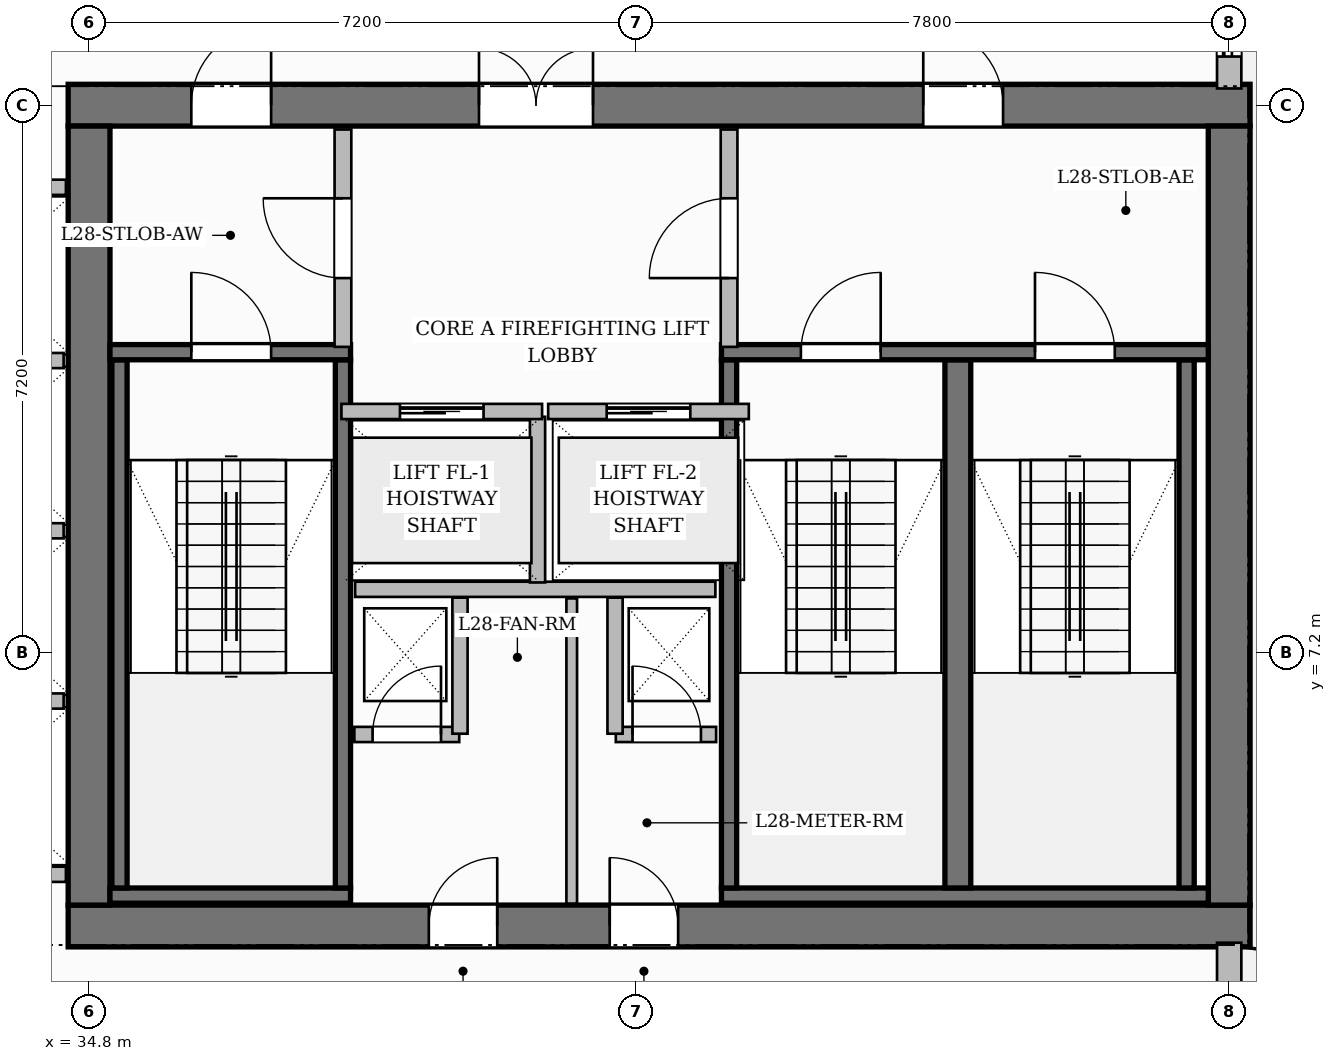
"""IFC4 building model, lengths in metres.
Left out: names, types, materials, properties, quantities, classifications, styles, units other than length and angle.
Written with IfcOpenShell. Run it as: python <this file> out.ifc"""

import sys

from ifc_helpers import new_model, si_unit, direction, frame, frame_2d, origin, place, context, subcontext, project, spatial, rectangle, extrude, source, transform, mapped, element, fill, save


model = new_model("IFC4")
c1 = context("Model", 3, precision=1e-05, world=origin(), true_north=direction((0.0, 1.0)))
c2 = subcontext(c1, "Body", "Model", "MODEL_VIEW")
j1 = project(units=[si_unit("LENGTHUNIT", "METRE"), si_unit("PLANEANGLEUNIT", "RADIAN")], contexts=[c1])
p1 = place(None, origin())
s1 = spatial("IfcSite", under=j1, at=p1, CompositionType="ELEMENT")
p2 = place(p1, origin())
s2 = spatial("IfcBuilding", under=s1, at=p2, CompositionType="ELEMENT")
p3 = place(p2, frame((0.0, 0.0, 115.5)))
s3 = spatial("IfcBuildingStorey", under=s2, at=p3, CompositionType="ELEMENT", Elevation=115.5)
p4 = place(p3, frame((34.525, 3.6, 0.0), z_axis=(0.0, 0.0, 1.0), x_axis=(1.0, 0.0, 0.0)))
e1 = element("IfcWall", 1, at=p4, inside=s3, PredefinedType="SHEAR", context=c2, shape_type="SweptSolid", body=[
    extrude(rectangle(XDim=15.55, YDim=0.55, at=frame_2d((7.775, 0.0))), origin(), (0.0, 0.0, 1.0), 3.7),
])
p5 = place(p4, frame((4.745, 0.0, 0.0)))
e2 = element("IfcOpeningElement", 2, at=p5, cuts=e1, PredefinedType="OPENING", context=c2, shape_type="SweptSolid", body=[
    extrude(rectangle(XDim=0.9, YDim=2.1, at=frame_2d((0.45, 1.05))), frame((0.0, 0.285, 0.0), z_axis=(0.0, -1.0, 0.0), x_axis=(1.0, 0.0, 0.0)), (0.0, 0.0, 1.0), 0.57),
])
p6 = place(p4, frame((7.125, 0.0, 0.0)))
e3 = element("IfcOpeningElement", 3, at=p6, cuts=e1, PredefinedType="OPENING", context=c2, shape_type="SweptSolid", body=[
    extrude(rectangle(XDim=0.9, YDim=2.1, at=frame_2d((0.45, 1.05))), frame((0.0, 0.285, 0.0), z_axis=(0.0, -1.0, 0.0), x_axis=(1.0, 0.0, 0.0)), (0.0, 0.0, 1.0), 0.57),
])
p7 = place(p3, frame((34.525, 14.4, 0.0), z_axis=(0.0, 0.0, 1.0), x_axis=(1.0, 0.0, 0.0)))
e4 = element("IfcWall", 4, at=p7, inside=s3, PredefinedType="SHEAR", context=c2, shape_type="SweptSolid", body=[
    extrude(rectangle(XDim=15.55, YDim=0.55, at=frame_2d((7.775, 0.0))), origin(), (0.0, 0.0, 1.0), 3.7),
])
p8 = place(p7, frame((5.405, 0.0, 0.0)))
e5 = element("IfcOpeningElement", 5, at=p8, cuts=e4, PredefinedType="OPENING", context=c2, shape_type="SweptSolid", body=[
    extrude(rectangle(XDim=1.5, YDim=2.2, at=frame_2d((0.75, 1.1))), frame((0.0, 0.285, 0.0), z_axis=(0.0, -1.0, 0.0), x_axis=(1.0, 0.0, 0.0)), (0.0, 0.0, 1.0), 0.57),
])
p9 = place(p7, frame((1.62, 0.0, 0.0)))
e6 = element("IfcOpeningElement", 6, at=p9, cuts=e4, PredefinedType="OPENING", context=c2, shape_type="SweptSolid", body=[
    extrude(rectangle(XDim=1.05, YDim=2.15, at=frame_2d((0.525, 1.075))), frame((0.0, 0.285, 0.0), z_axis=(0.0, -1.0, 0.0), x_axis=(1.0, 0.0, 0.0)), (0.0, 0.0, 1.0), 0.57),
])
p10 = place(p7, frame((11.25, 0.0, 0.0)))
e7 = element("IfcOpeningElement", 7, at=p10, cuts=e4, PredefinedType="OPENING", context=c2, shape_type="SweptSolid", body=[
    extrude(rectangle(XDim=1.05, YDim=2.15, at=frame_2d((0.525, 1.075))), frame((0.0, 0.285, 0.0), z_axis=(0.0, -1.0, 0.0), x_axis=(1.0, 0.0, 0.0)), (0.0, 0.0, 1.0), 0.57),
])
for number, where, z_axis, x_axis in (
    (8, (34.8, 3.875, 0.0), (0.0, 0.0, 1.0), (0.0, 1.0, 0.0)),
    (9, (49.8, 3.875, 0.0), (0.0, 0.0, 1.0), (0.0, 1.0, 0.0)),
):
    element("IfcWall", number, at=place(p3, frame(where, z_axis=z_axis, x_axis=x_axis)), inside=s3, PredefinedType="SHEAR", context=c2, shape_type="SweptSolid", body=[
        extrude(rectangle(XDim=10.25, YDim=0.55, at=frame_2d((5.125, 0.0))), origin(), (0.0, 0.0, 1.0), 3.7),
    ])
p11 = place(p3, frame((35.075, 4.0, 0.0), z_axis=(0.0, 0.0, 1.0), x_axis=(1.0, 0.0, 0.0)))
e10 = element("IfcWall", 10, at=p11, inside=s3, PredefinedType="SHEAR", context=c2, shape_type="SweptSolid", body=[
    extrude(rectangle(XDim=3.165, YDim=0.2, at=frame_2d((1.583, 0.0))), origin(), (0.0, 0.0, 1.0), 3.7),
])
for number, where, z_axis, x_axis in (
    (11, (35.2, 4.1, 0.0), (0.0, 0.0, 1.0), (0.0, 1.0, 0.0)),
    (12, (38.14, 4.1, 0.0), (0.0, 0.0, 1.0), (0.0, 1.0, 0.0)),
):
    element("IfcWall", number, at=place(p3, frame(where, z_axis=z_axis, x_axis=x_axis)), inside=s3, PredefinedType="SHEAR", context=c2, shape_type="SweptSolid", body=[
        extrude(rectangle(XDim=6.95, YDim=0.2, at=frame_2d((3.475, 0.0))), origin(), (0.0, 0.0, 1.0), 3.7),
    ])
p12 = place(p3, frame((35.075, 11.15, 0.0), z_axis=(0.0, 0.0, 1.0), x_axis=(1.0, 0.0, 0.0)))
e13 = element("IfcWall", 13, at=p12, inside=s3, PredefinedType="SHEAR", context=c2, shape_type="SweptSolid", body=[
    extrude(rectangle(XDim=3.165, YDim=0.2, at=frame_2d((1.583, 0.0))), origin(), (0.0, 0.0, 1.0), 3.7),
])
p13 = place(p12, frame((1.07, 0.0, 0.0)))
e14 = element("IfcOpeningElement", 14, at=p13, cuts=e13, PredefinedType="OPENING", context=c2, shape_type="SweptSolid", body=[
    extrude(rectangle(XDim=1.05, YDim=2.2, at=frame_2d((0.525, 1.1))), frame((0.0, 0.11, 0.0), z_axis=(0.0, -1.0, 0.0), x_axis=(1.0, 0.0, 0.0)), (0.0, 0.0, 1.0), 0.22),
])
p14 = place(p3, frame((43.12, 4.0, 0.0), z_axis=(0.0, 0.0, 1.0), x_axis=(1.0, 0.0, 0.0)))
e15 = element("IfcWall", 15, at=p14, inside=s3, PredefinedType="SHEAR", context=c2, shape_type="SweptSolid", body=[
    extrude(rectangle(XDim=6.405, YDim=0.2, at=frame_2d((3.202, 0.0))), origin(), (0.0, 0.0, 1.0), 3.7),
])
p15 = place(p3, frame((43.22, 4.1, 0.0), z_axis=(0.0, 0.0, 1.0), x_axis=(0.0, 1.0, 0.0)))
e16 = element("IfcWall", 16, at=p15, inside=s3, PredefinedType="SHEAR", context=c2, shape_type="SweptSolid", body=[
    extrude(rectangle(XDim=6.95, YDim=0.2, at=frame_2d((3.475, 0.0))), origin(), (0.0, 0.0, 1.0), 3.7),
])
p16 = place(p3, frame((46.23, 4.1, 0.0), z_axis=(0.0, 0.0, 1.0), x_axis=(0.0, 1.0, 0.0)))
e17 = element("IfcWall", 17, at=p16, inside=s3, PredefinedType="SHEAR", context=c2, shape_type="SweptSolid", body=[
    extrude(rectangle(XDim=6.95, YDim=0.34, at=frame_2d((3.475, 0.0))), origin(), (0.0, 0.0, 1.0), 3.7),
])
p17 = place(p3, frame((49.24, 4.1, 0.0), z_axis=(0.0, 0.0, 1.0), x_axis=(0.0, 1.0, 0.0)))
e18 = element("IfcWall", 18, at=p17, inside=s3, PredefinedType="SHEAR", context=c2, shape_type="SweptSolid", body=[
    extrude(rectangle(XDim=6.95, YDim=0.2, at=frame_2d((3.475, 0.0))), origin(), (0.0, 0.0, 1.0), 3.7),
])
p18 = place(p3, frame((43.12, 11.15, 0.0), z_axis=(0.0, 0.0, 1.0), x_axis=(1.0, 0.0, 0.0)))
e19 = element("IfcWall", 19, at=p18, inside=s3, PredefinedType="SHEAR", context=c2, shape_type="SweptSolid", body=[
    extrude(rectangle(XDim=6.405, YDim=0.2, at=frame_2d((3.202, 0.0))), origin(), (0.0, 0.0, 1.0), 3.7),
])
p19 = place(p18, frame((1.045, 0.0, 0.0)))
e20 = element("IfcOpeningElement", 20, at=p19, cuts=e19, PredefinedType="OPENING", context=c2, shape_type="SweptSolid", body=[
    extrude(rectangle(XDim=1.05, YDim=2.2, at=frame_2d((0.525, 1.1))), frame((0.0, 0.11, 0.0), z_axis=(0.0, -1.0, 0.0), x_axis=(1.0, 0.0, 0.0)), (0.0, 0.0, 1.0), 0.22),
])
p20 = place(p18, frame((4.125, 0.0, 0.0)))
e21 = element("IfcOpeningElement", 21, at=p20, cuts=e19, PredefinedType="OPENING", context=c2, shape_type="SweptSolid", body=[
    extrude(rectangle(XDim=1.05, YDim=2.2, at=frame_2d((0.525, 1.1))), frame((0.0, 0.11, 0.0), z_axis=(0.0, -1.0, 0.0), x_axis=(1.0, 0.0, 0.0)), (0.0, 0.0, 1.0), 0.22),
])
p21 = place(p3, frame((38.3, 8.03, 0.0), z_axis=(0.0, 0.0, 1.0), x_axis=(1.0, 0.0, 0.0)))
e22 = element("IfcWall", 22, at=p21, inside=s3, PredefinedType="PARTITIONING", context=c2, shape_type="SweptSolid", body=[
    extrude(rectangle(XDim=4.74, YDim=0.2, at=frame_2d((2.37, 0.0))), origin(), (0.0, 0.0, 1.0), 3.45),
])
p22 = place(p3, frame((40.7, 8.12, 0.0), z_axis=(0.0, 0.0, 1.0), x_axis=(0.0, 1.0, 0.0)))
e23 = element("IfcWall", 23, at=p22, inside=s3, PredefinedType="PARTITIONING", context=c2, shape_type="SweptSolid", body=[
    extrude(rectangle(XDim=2.18, YDim=0.2, at=frame_2d((1.09, 0.0))), origin(), (0.0, 0.0, 1.0), 3.45),
])
p23 = place(p3, frame((38.14, 11.22, 0.0), z_axis=(0.0, 0.0, 1.0), x_axis=(0.0, 1.0, 0.0)))
e24 = element("IfcWall", 24, at=p23, inside=s3, PredefinedType="PARTITIONING", context=c2, shape_type="SweptSolid", body=[
    extrude(rectangle(XDim=2.86, YDim=0.22, at=frame_2d((1.43, 0.0))), origin(), (0.0, 0.0, 1.0), 3.45),
])
p24 = place(p23, frame((0.905, 0.0, 0.0)))
e25 = element("IfcOpeningElement", 25, at=p24, cuts=e24, PredefinedType="OPENING", context=c2, shape_type="SweptSolid", body=[
    extrude(rectangle(XDim=1.05, YDim=2.15, at=frame_2d((0.525, 1.075))), frame((0.0, 0.12, 0.0), z_axis=(0.0, -1.0, 0.0), x_axis=(1.0, 0.0, 0.0)), (0.0, 0.0, 1.0), 0.24),
])
p25 = place(p3, frame((43.22, 11.22, 0.0), z_axis=(0.0, 0.0, 1.0), x_axis=(0.0, 1.0, 0.0)))
e26 = element("IfcWall", 26, at=p25, inside=s3, PredefinedType="PARTITIONING", context=c2, shape_type="SweptSolid", body=[
    extrude(rectangle(XDim=2.86, YDim=0.22, at=frame_2d((1.43, 0.0))), origin(), (0.0, 0.0, 1.0), 3.45),
])
p26 = place(p25, frame((0.905, 0.0, 0.0)))
e27 = element("IfcOpeningElement", 27, at=p26, cuts=e26, PredefinedType="OPENING", context=c2, shape_type="SweptSolid", body=[
    extrude(rectangle(XDim=1.05, YDim=2.15, at=frame_2d((0.525, 1.075))), frame((0.0, 0.12, 0.0), z_axis=(0.0, -1.0, 0.0), x_axis=(1.0, 0.0, 0.0)), (0.0, 0.0, 1.0), 0.24),
])
p27 = place(p3, frame((38.29, 6.12, 0.0), z_axis=(0.0, 0.0, 1.0), x_axis=(1.0, 0.0, 0.0)))
e28 = element("IfcWall", 28, at=p27, inside=s3, PredefinedType="PARTITIONING", context=c2, shape_type="SweptSolid", body=[
    extrude(rectangle(XDim=1.38, YDim=0.2, at=frame_2d((0.69, 0.0))), origin(), (0.0, 0.0, 1.0), 3.45),
])
p28 = place(p27, frame((0.24, 0.0, 0.0)))
e29 = element("IfcOpeningElement", 29, at=p28, cuts=e28, PredefinedType="OPENING", context=c2, shape_type="SweptSolid", body=[
    extrude(rectangle(XDim=0.9, YDim=2.1, at=frame_2d((0.45, 1.05))), frame((0.0, 0.11, 0.0), z_axis=(0.0, -1.0, 0.0), x_axis=(1.0, 0.0, 0.0)), (0.0, 0.0, 1.0), 0.22),
])
p29 = place(p3, frame((39.68, 6.13, 0.0), z_axis=(0.0, 0.0, 1.0), x_axis=(0.0, 1.0, 0.0)))
e30 = element("IfcWall", 30, at=p29, inside=s3, PredefinedType="PARTITIONING", context=c2, shape_type="SweptSolid", body=[
    extrude(rectangle(XDim=1.79, YDim=0.2, at=frame_2d((0.895, 0.0))), origin(), (0.0, 0.0, 1.0), 3.45),
])
p30 = place(p3, frame((41.73, 6.12, 0.0), z_axis=(0.0, 0.0, 1.0), x_axis=(1.0, 0.0, 0.0)))
e31 = element("IfcWall", 31, at=p30, inside=s3, PredefinedType="PARTITIONING", context=c2, shape_type="SweptSolid", body=[
    extrude(rectangle(XDim=1.32, YDim=0.2, at=frame_2d((0.66, 0.0))), origin(), (0.0, 0.0, 1.0), 3.45),
])
p31 = place(p30, frame((0.22, 0.0, 0.0)))
e32 = element("IfcOpeningElement", 32, at=p31, cuts=e31, PredefinedType="OPENING", context=c2, shape_type="SweptSolid", body=[
    extrude(rectangle(XDim=0.9, YDim=2.1, at=frame_2d((0.45, 1.05))), frame((0.0, 0.11, 0.0), z_axis=(0.0, -1.0, 0.0), x_axis=(1.0, 0.0, 0.0)), (0.0, 0.0, 1.0), 0.22),
])
p32 = place(p3, frame((41.72, 6.13, 0.0), z_axis=(0.0, 0.0, 1.0), x_axis=(0.0, 1.0, 0.0)))
e33 = element("IfcWall", 33, at=p32, inside=s3, PredefinedType="PARTITIONING", context=c2, shape_type="SweptSolid", body=[
    extrude(rectangle(XDim=1.79, YDim=0.2, at=frame_2d((0.895, 0.0))), origin(), (0.0, 0.0, 1.0), 3.45),
])
p33 = place(p3, frame((41.15, 3.895, 0.0), z_axis=(0.0, 0.0, 1.0), x_axis=(0.0, 1.0, 0.0)))
e34 = element("IfcWall", 34, at=p33, inside=s3, PredefinedType="PARTITIONING", context=c2, shape_type="SweptSolid", body=[
    extrude(rectangle(XDim=4.015, YDim=0.14, at=frame_2d((2.007, 0.0))), origin(), (0.0, 0.0, 1.0), 3.45),
])
for number, where, z_axis, x_axis in (
    (35, (32.16, 4.28, 0.0), (0.0, 0.0, 1.0), (1.0, 0.0, 0.0)),
    (36, (32.16, 13.32, 0.0), (0.0, 0.0, 1.0), (1.0, 0.0, 0.0)),
):
    element("IfcWall", number, at=place(p3, frame(where, z_axis=z_axis, x_axis=x_axis)), inside=s3, PredefinedType="PARTITIONING", context=c2, shape_type="SweptSolid", body=[
        extrude(rectangle(XDim=2.335, YDim=0.2, at=frame_2d((1.167, 0.0))), origin(), (0.0, 0.0, 1.0), 3.45),
    ])
for number, where, z_axis, x_axis in (
    (37, (32.26, 6.56, 0.0), (0.0, 0.0, 1.0), (1.0, 0.0, 0.0)),
    (38, (32.26, 8.8, 0.0), (0.0, 0.0, 1.0), (1.0, 0.0, 0.0)),
    (39, (32.26, 11.04, 0.0), (0.0, 0.0, 1.0), (1.0, 0.0, 0.0)),
):
    element("IfcWall", number, at=place(p3, frame(where, z_axis=z_axis, x_axis=x_axis)), inside=s3, PredefinedType="PARTITIONING", context=c2, shape_type="SweptSolid", body=[
        extrude(rectangle(XDim=2.205, YDim=0.2, at=frame_2d((1.103, 0.0))), origin(), (0.0, 0.0, 1.0), 3.45),
    ])
p34 = place(p3, frame((38.12, 10.37, 0.0), z_axis=(0.0, 0.0, 1.0), x_axis=(1.0, 0.0, 0.0)))
e40 = element("IfcWall", 40, at=p34, inside=s3, PredefinedType="PARTITIONING", context=c2, shape_type="SweptSolid", body=[
    extrude(rectangle(XDim=2.64, YDim=0.2, at=frame_2d((1.32, 0.0))), origin(), (0.0, 0.0, 1.0), 3.45),
])
p35 = place(p34, frame((0.77, 0.0, 0.0)))
e41 = element("IfcOpeningElement", 41, at=p35, cuts=e40, PredefinedType="OPENING", context=c2, shape_type="SweptSolid", body=[
    extrude(rectangle(XDim=1.1, YDim=2.2, at=frame_2d((0.55, 1.1))), frame((0.0, 0.11, 0.0), z_axis=(0.0, -1.0, 0.0), x_axis=(1.0, 0.0, 0.0)), (0.0, 0.0, 1.0), 0.22),
])
p36 = place(p3, frame((40.84, 10.37, 0.0), z_axis=(0.0, 0.0, 1.0), x_axis=(1.0, 0.0, 0.0)))
e42 = element("IfcWall", 42, at=p36, inside=s3, PredefinedType="PARTITIONING", context=c2, shape_type="SweptSolid", body=[
    extrude(rectangle(XDim=2.64, YDim=0.2, at=frame_2d((1.32, 0.0))), origin(), (0.0, 0.0, 1.0), 3.45),
])
p37 = place(p36, frame((0.77, 0.0, 0.0)))
e43 = element("IfcOpeningElement", 43, at=p37, cuts=e42, PredefinedType="OPENING", context=c2, shape_type="SweptSolid", body=[
    extrude(rectangle(XDim=1.1, YDim=2.2, at=frame_2d((0.55, 1.1))), frame((0.0, 0.11, 0.0), z_axis=(0.0, -1.0, 0.0), x_axis=(1.0, 0.0, 0.0)), (0.0, 0.0, 1.0), 0.22),
])
p38 = place(p3, frame((49.8, 0.05, 0.0), z_axis=(0.0, 0.0, 1.0), x_axis=(0.0, 1.0, 0.0)))
e44 = element("IfcWall", 44, at=p38, inside=s3, PredefinedType="SOLIDWALL", context=c2, shape_type="SweptSolid", body=[
    extrude(rectangle(XDim=3.33, YDim=0.32, at=frame_2d((1.665, 0.0))), origin(), (0.0, 0.0, 1.0), 3.45),
])
p39 = place(p3, frame((49.8, 14.62, 0.0), z_axis=(0.0, 0.0, 1.0), x_axis=(0.0, 1.0, 0.0)))
e45 = element("IfcWall", 45, at=p39, inside=s3, PredefinedType="SOLIDWALL", context=c2, shape_type="SweptSolid", body=[
    extrude(rectangle(XDim=6.93, YDim=0.32, at=frame_2d((3.465, 0.0))), origin(), (0.0, 0.0, 1.0), 2.935),
])
p40 = place(p39, frame((0.42, 0.0, 0.0)))
e46 = element("IfcOpeningElement", 46, at=p40, cuts=e45, PredefinedType="OPENING", context=c2, shape_type="SweptSolid", body=[
    extrude(rectangle(XDim=1.2, YDim=2.2, at=frame_2d((0.6, 1.1))), frame((0.0, 0.17, 0.0), z_axis=(0.0, -1.0, 0.0), x_axis=(1.0, 0.0, 0.0)), (0.0, 0.0, 1.0), 0.34),
])
p41 = place(p39, frame((3.659, 0.0, 0.8)))
e47 = element("IfcOpeningElement", 47, at=p41, cuts=e45, PredefinedType="OPENING", context=c2, shape_type="SweptSolid", body=[
    extrude(rectangle(XDim=1.8, YDim=1.85, at=frame_2d((0.9, 0.925))), frame((0.0, 0.17, 0.0), z_axis=(0.0, -1.0, 0.0), x_axis=(1.0, 0.0, 0.0)), (0.0, 0.0, 1.0), 0.34),
])
m1 = source(origin(), c2, "Body", "SweptSolid", [
    extrude(rectangle(XDim=1.05, YDim=2.2, at=frame_2d((0.525, 1.1))), frame((0.0, 0.025, 0.0), z_axis=(0.0, -1.0, 0.0), x_axis=(1.0, 0.0, 0.0)), (0.0, 0.0, 1.0), 0.05),
])
p42 = place(p13, origin())
e48 = element("IfcDoor", 48, at=p42, inside=s3, OperationType="SINGLE_SWING_LEFT", PredefinedType="DOOR", context=c2, shape_type="MappedRepresentation", body=[
    mapped(m1, transform((0.0, 0.0, 0.0), scale=1.0)),
])
fill(e14, e48)
p43 = place(p19, origin())
e49 = element("IfcDoor", 49, at=p43, inside=s3, OperationType="SINGLE_SWING_RIGHT", PredefinedType="DOOR", context=c2, shape_type="MappedRepresentation", body=[
    mapped(m1, transform((0.0, 0.0, 0.0), scale=1.0)),
])
fill(e20, e49)
p44 = place(p20, origin())
e50 = element("IfcDoor", 50, at=p44, inside=s3, OperationType="SINGLE_SWING_LEFT", PredefinedType="DOOR", context=c2, shape_type="MappedRepresentation", body=[
    mapped(m1, transform((0.0, 0.0, 0.0), scale=1.0)),
])
fill(e21, e50)
m2 = source(origin(), c2, "Body", "SweptSolid", [
    extrude(rectangle(XDim=1.05, YDim=2.15, at=frame_2d((0.525, 1.075))), frame((0.0, 0.025, 0.0), z_axis=(0.0, -1.0, 0.0), x_axis=(1.0, 0.0, 0.0)), (0.0, 0.0, 1.0), 0.05),
])
p45 = place(p24, origin())
e51 = element("IfcDoor", 51, at=p45, inside=s3, OperationType="SINGLE_SWING_RIGHT", PredefinedType="DOOR", context=c2, shape_type="MappedRepresentation", body=[
    mapped(m2, transform((0.0, 0.0, 0.0), scale=1.0)),
])
fill(e25, e51)
p46 = place(p26, origin())
e52 = element("IfcDoor", 52, at=p46, inside=s3, OperationType="SINGLE_SWING_LEFT", PredefinedType="DOOR", context=c2, shape_type="MappedRepresentation", body=[
    mapped(m2, transform((0.0, 0.0, 0.0), scale=1.0)),
])
fill(e27, e52)
m3 = source(origin(), c2, "Body", "SweptSolid", [
    extrude(rectangle(XDim=1.5, YDim=2.2, at=frame_2d((0.75, 1.1))), frame((0.0, 0.025, 0.0), z_axis=(0.0, -1.0, 0.0), x_axis=(1.0, 0.0, 0.0)), (0.0, 0.0, 1.0), 0.05),
])
p47 = place(p8, origin())
e53 = element("IfcDoor", 53, at=p47, inside=s3, OperationType="DOUBLE_DOOR_SINGLE_SWING", PredefinedType="DOOR", context=c2, shape_type="MappedRepresentation", body=[
    mapped(m3, transform((0.0, 0.0, 0.0), scale=1.0)),
])
fill(e5, e53)
p48 = place(p9, origin())
e54 = element("IfcDoor", 54, at=p48, inside=s3, OperationType="SINGLE_SWING_RIGHT", PredefinedType="DOOR", context=c2, shape_type="MappedRepresentation", body=[
    mapped(m2, transform((0.0, 0.0, 0.0), scale=1.0)),
])
fill(e6, e54)
p49 = place(p10, origin())
e55 = element("IfcDoor", 55, at=p49, inside=s3, OperationType="SINGLE_SWING_LEFT", PredefinedType="DOOR", context=c2, shape_type="MappedRepresentation", body=[
    mapped(m2, transform((0.0, 0.0, 0.0), scale=1.0)),
])
fill(e7, e55)
m4 = source(origin(), c2, "Body", "SweptSolid", [
    extrude(rectangle(XDim=0.9, YDim=2.1, at=frame_2d((0.45, 1.05))), frame((0.0, 0.025, 0.0), z_axis=(0.0, -1.0, 0.0), x_axis=(1.0, 0.0, 0.0)), (0.0, 0.0, 1.0), 0.05),
])
p50 = place(p28, origin())
e56 = element("IfcDoor", 56, at=p50, inside=s3, OperationType="SINGLE_SWING_RIGHT", PredefinedType="DOOR", context=c2, shape_type="MappedRepresentation", body=[
    mapped(m4, transform((0.0, 0.0, 0.0), scale=1.0)),
])
fill(e29, e56)
p51 = place(p31, origin())
e57 = element("IfcDoor", 57, at=p51, inside=s3, OperationType="SINGLE_SWING_LEFT", PredefinedType="DOOR", context=c2, shape_type="MappedRepresentation", body=[
    mapped(m4, transform((0.0, 0.0, 0.0), scale=1.0)),
])
fill(e32, e57)
p52 = place(p5, origin())
e58 = element("IfcDoor", 58, at=p52, inside=s3, OperationType="SINGLE_SWING_RIGHT", PredefinedType="DOOR", context=c2, shape_type="MappedRepresentation", body=[
    mapped(m4, transform((0.0, 0.0, 0.0), scale=1.0)),
])
fill(e2, e58)
p53 = place(p6, origin())
e59 = element("IfcDoor", 59, at=p53, inside=s3, OperationType="SINGLE_SWING_LEFT", PredefinedType="DOOR", context=c2, shape_type="MappedRepresentation", body=[
    mapped(m4, transform((0.0, 0.0, 0.0), scale=1.0)),
])
fill(e3, e59)
m5 = source(origin(), c2, "Body", "SweptSolid", [
    extrude(rectangle(XDim=1.1, YDim=2.2, at=frame_2d((0.55, 1.1))), frame((0.0, 0.025, 0.0), z_axis=(0.0, -1.0, 0.0), x_axis=(1.0, 0.0, 0.0)), (0.0, 0.0, 1.0), 0.05),
])
p54 = place(p35, origin())
e60 = element("IfcDoor", 60, at=p54, inside=s3, OperationType="SLIDING_TO_LEFT", PredefinedType="DOOR", context=c2, shape_type="MappedRepresentation", body=[
    mapped(m5, transform((0.0, 0.0, 0.0), scale=1.0)),
])
fill(e41, e60)
p55 = place(p37, origin())
e61 = element("IfcDoor", 61, at=p55, inside=s3, OperationType="SLIDING_TO_LEFT", PredefinedType="DOOR", context=c2, shape_type="MappedRepresentation", body=[
    mapped(m5, transform((0.0, 0.0, 0.0), scale=1.0)),
])
fill(e43, e61)
m6 = source(origin(), c2, "Body", "SweptSolid", [
    extrude(rectangle(XDim=1.2, YDim=2.2, at=frame_2d((0.6, 1.1))), frame((0.0, 0.025, 0.0), z_axis=(0.0, -1.0, 0.0), x_axis=(1.0, 0.0, 0.0)), (0.0, 0.0, 1.0), 0.05),
])
p56 = place(p40, origin())
e62 = element("IfcDoor", 62, at=p56, inside=s3, OperationType="SLIDING_TO_LEFT", PredefinedType="DOOR", context=c2, shape_type="MappedRepresentation", body=[
    mapped(m6, transform((0.0, 0.0, 0.0), scale=1.0)),
])
fill(e46, e62)
save(model, sys.argv[1])
